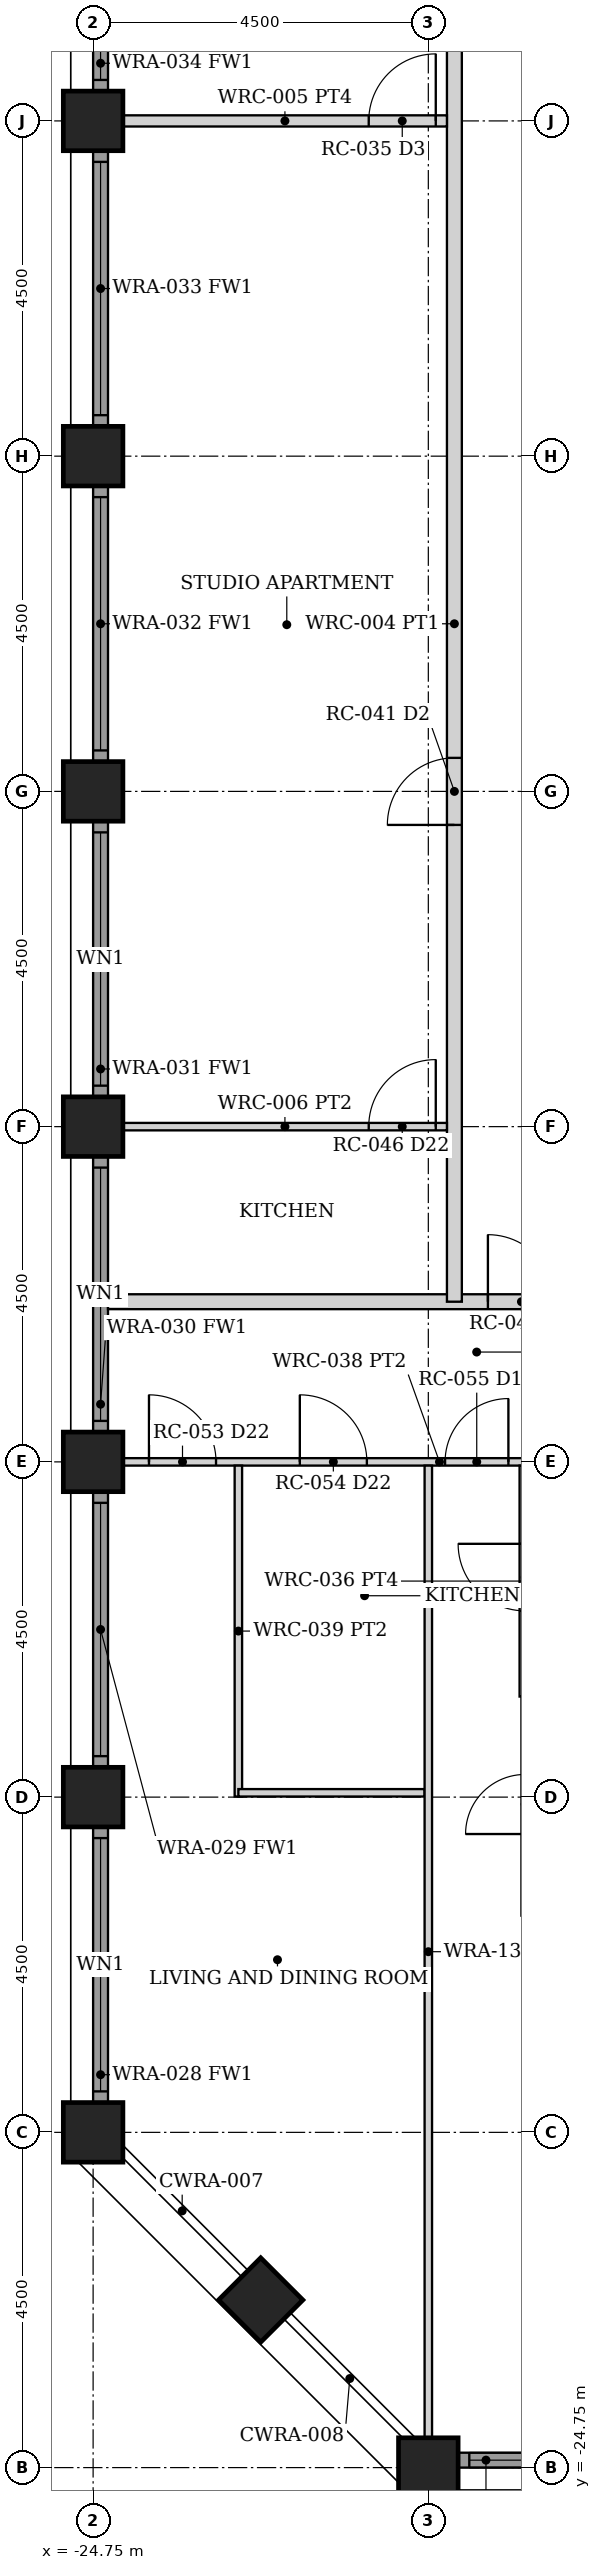
"""IFC4 building model, lengths in metres.
Left out: names, types, materials, properties, quantities, classifications, styles, units other than length and angle.
Written with IfcOpenShell. Run it as: python <this file> out.ifc"""

import sys

from ifc_helpers import new_model, si_unit, direction, frame, frame_2d, origin, origin_2d, place, context, subcontext, project, spatial, rectangle, hollow_rectangle, extrude, element, fill, save


model = new_model("IFC4")
c1 = context("Model", 3, precision=1e-05, world=origin(), true_north=direction((0.0, 1.0)))
c2 = subcontext(c1, "Body", "Model", "MODEL_VIEW")
j1 = project(units=[si_unit("LENGTHUNIT", "METRE"), si_unit("PLANEANGLEUNIT", "RADIAN")], contexts=[c1])
p1 = place(None, origin())
s1 = spatial("IfcSite", under=j1, at=p1, CompositionType="ELEMENT")
p2 = place(p1, origin())
s2 = spatial("IfcBuilding", under=s1, at=p2, CompositionType="ELEMENT")
p3 = place(p2, frame((0.0, 0.0, 47.5)))
s3 = spatial("IfcBuildingStorey", under=s2, at=p3, CompositionType="ELEMENT", Elevation=47.5)
for number, where, z_axis, x_axis in (
    (1, (-20.25, -24.75, 0.0), (0.0, 0.0, 1.0), (0.0, 1.0, 0.0)),
    (2, (-24.75, -20.25, 0.0), (0.0, 0.0, 1.0), (1.0, 0.0, 0.0)),
    (3, (-24.75, -15.75, 0.0), (0.0, 0.0, 1.0), (1.0, 0.0, 0.0)),
    (4, (-24.75, -11.25, 0.0), (0.0, 0.0, 1.0), (1.0, 0.0, 0.0)),
    (5, (-24.75, -6.75, 0.0), (0.0, 0.0, 1.0), (1.0, 0.0, 0.0)),
    (6, (-24.75, -2.25, 0.0), (0.0, 0.0, 1.0), (1.0, 0.0, 0.0)),
    (7, (-24.75, 2.25, 0.0), (0.0, 0.0, 1.0), (1.0, 0.0, 0.0)),
    (8, (-24.75, 6.75, 0.0), (0.0, 0.0, 1.0), (1.0, 0.0, 0.0)),
    (9, (-22.5, -22.5, 0.0), (0.0, 0.0, 1.0), (0.707, 0.707, 0.0)),
):
    element("IfcColumn", number, at=place(p3, frame(where, z_axis=z_axis, x_axis=x_axis)), inside=s3, PredefinedType="COLUMN", context=c2, shape_type="SweptSolid", body=[
        extrude(hollow_rectangle(XDim=0.8, YDim=0.8, WallThickness=0.07, at=origin_2d()), origin(), (0.0, 0.0, 1.0), 3.5),
    ])
p4 = place(p3, frame((-19.845, -24.65, 0.0), z_axis=(0.0, 0.0, 1.0), x_axis=(1.0, 0.0, 0.0)))
e10 = element("IfcWall", 10, at=p4, inside=s3, PredefinedType="SOLIDWALL", context=c2, shape_type="SweptSolid", body=[
    extrude(rectangle(XDim=3.69, YDim=0.2, at=frame_2d((1.845, 0.0))), origin(), (0.0, 0.0, 1.0), 2.379),
])
p5 = place(p4, frame((0.145, 0.0, 0.3)))
e11 = element("IfcOpeningElement", 11, at=p5, cuts=e10, PredefinedType="OPENING", context=c2, shape_type="SweptSolid", body=[
    extrude(rectangle(XDim=3.4, YDim=1.929, at=frame_2d((1.7, 0.964))), frame((0.0, 0.11, 0.0), z_axis=(0.0, -1.0, 0.0), x_axis=(1.0, 0.0, 0.0)), (0.0, 0.0, 1.0), 0.22),
])
p6 = place(p3, frame((-24.65, -19.845, 0.0), z_axis=(0.0, 0.0, 1.0), x_axis=(0.0, 1.0, 0.0)))
e12 = element("IfcWall", 12, at=p6, inside=s3, PredefinedType="SOLIDWALL", context=c2, shape_type="SweptSolid", body=[
    extrude(rectangle(XDim=3.69, YDim=0.2, at=frame_2d((1.845, 0.0))), origin(), (0.0, 0.0, 1.0), 2.379),
])
p7 = place(p6, frame((0.145, 0.0, 0.3)))
e13 = element("IfcOpeningElement", 13, at=p7, cuts=e12, PredefinedType="OPENING", context=c2, shape_type="SweptSolid", body=[
    extrude(rectangle(XDim=3.4, YDim=1.929, at=frame_2d((1.7, 0.964))), frame((0.0, 0.11, 0.0), z_axis=(0.0, -1.0, 0.0), x_axis=(1.0, 0.0, 0.0)), (0.0, 0.0, 1.0), 0.22),
])
p8 = place(p3, frame((-24.65, -15.345, 0.0), z_axis=(0.0, 0.0, 1.0), x_axis=(0.0, 1.0, 0.0)))
e14 = element("IfcWall", 14, at=p8, inside=s3, PredefinedType="SOLIDWALL", context=c2, shape_type="SweptSolid", body=[
    extrude(rectangle(XDim=3.69, YDim=0.2, at=frame_2d((1.845, 0.0))), origin(), (0.0, 0.0, 1.0), 2.379),
])
p9 = place(p8, frame((0.145, 0.0, 0.3)))
e15 = element("IfcOpeningElement", 15, at=p9, cuts=e14, PredefinedType="OPENING", context=c2, shape_type="SweptSolid", body=[
    extrude(rectangle(XDim=3.4, YDim=1.929, at=frame_2d((1.7, 0.964))), frame((0.0, 0.11, 0.0), z_axis=(0.0, -1.0, 0.0), x_axis=(1.0, 0.0, 0.0)), (0.0, 0.0, 1.0), 0.22),
])
p10 = place(p3, frame((-24.65, -10.845, 0.0), z_axis=(0.0, 0.0, 1.0), x_axis=(0.0, 1.0, 0.0)))
e16 = element("IfcWall", 16, at=p10, inside=s3, PredefinedType="SOLIDWALL", context=c2, shape_type="SweptSolid", body=[
    extrude(rectangle(XDim=3.69, YDim=0.2, at=frame_2d((1.845, 0.0))), origin(), (0.0, 0.0, 1.0), 2.379),
])
p11 = place(p10, frame((0.145, 0.0, 0.3)))
e17 = element("IfcOpeningElement", 17, at=p11, cuts=e16, PredefinedType="OPENING", context=c2, shape_type="SweptSolid", body=[
    extrude(rectangle(XDim=3.4, YDim=1.929, at=frame_2d((1.7, 0.964))), frame((0.0, 0.11, 0.0), z_axis=(0.0, -1.0, 0.0), x_axis=(1.0, 0.0, 0.0)), (0.0, 0.0, 1.0), 0.22),
])
p12 = place(p3, frame((-24.65, -6.345, 0.0), z_axis=(0.0, 0.0, 1.0), x_axis=(0.0, 1.0, 0.0)))
e18 = element("IfcWall", 18, at=p12, inside=s3, PredefinedType="SOLIDWALL", context=c2, shape_type="SweptSolid", body=[
    extrude(rectangle(XDim=3.69, YDim=0.2, at=frame_2d((1.845, 0.0))), origin(), (0.0, 0.0, 1.0), 2.379),
])
p13 = place(p12, frame((0.145, 0.0, 0.3)))
e19 = element("IfcOpeningElement", 19, at=p13, cuts=e18, PredefinedType="OPENING", context=c2, shape_type="SweptSolid", body=[
    extrude(rectangle(XDim=3.4, YDim=1.929, at=frame_2d((1.7, 0.964))), frame((0.0, 0.11, 0.0), z_axis=(0.0, -1.0, 0.0), x_axis=(1.0, 0.0, 0.0)), (0.0, 0.0, 1.0), 0.22),
])
p14 = place(p3, frame((-24.65, -1.845, 0.0), z_axis=(0.0, 0.0, 1.0), x_axis=(0.0, 1.0, 0.0)))
e20 = element("IfcWall", 20, at=p14, inside=s3, PredefinedType="SOLIDWALL", context=c2, shape_type="SweptSolid", body=[
    extrude(rectangle(XDim=3.69, YDim=0.2, at=frame_2d((1.845, 0.0))), origin(), (0.0, 0.0, 1.0), 2.379),
])
p15 = place(p14, frame((0.145, 0.0, 0.3)))
e21 = element("IfcOpeningElement", 21, at=p15, cuts=e20, PredefinedType="OPENING", context=c2, shape_type="SweptSolid", body=[
    extrude(rectangle(XDim=3.4, YDim=1.929, at=frame_2d((1.7, 0.964))), frame((0.0, 0.11, 0.0), z_axis=(0.0, -1.0, 0.0), x_axis=(1.0, 0.0, 0.0)), (0.0, 0.0, 1.0), 0.22),
])
p16 = place(p3, frame((-24.65, 2.655, 0.0), z_axis=(0.0, 0.0, 1.0), x_axis=(0.0, 1.0, 0.0)))
e22 = element("IfcWall", 22, at=p16, inside=s3, PredefinedType="SOLIDWALL", context=c2, shape_type="SweptSolid", body=[
    extrude(rectangle(XDim=3.69, YDim=0.2, at=frame_2d((1.845, 0.0))), origin(), (0.0, 0.0, 1.0), 2.379),
])
p17 = place(p16, frame((0.145, 0.0, 0.3)))
e23 = element("IfcOpeningElement", 23, at=p17, cuts=e22, PredefinedType="OPENING", context=c2, shape_type="SweptSolid", body=[
    extrude(rectangle(XDim=3.4, YDim=1.929, at=frame_2d((1.7, 0.964))), frame((0.0, 0.11, 0.0), z_axis=(0.0, -1.0, 0.0), x_axis=(1.0, 0.0, 0.0)), (0.0, 0.0, 1.0), 0.22),
])
p18 = place(p3, frame((-24.65, 7.155, 0.0), z_axis=(0.0, 0.0, 1.0), x_axis=(0.0, 1.0, 0.0)))
e24 = element("IfcWall", 24, at=p18, inside=s3, PredefinedType="SOLIDWALL", context=c2, shape_type="SweptSolid", body=[
    extrude(rectangle(XDim=3.69, YDim=0.2, at=frame_2d((1.845, 0.0))), origin(), (0.0, 0.0, 1.0), 2.379),
])
p19 = place(p18, frame((0.145, 0.0, 0.3)))
e25 = element("IfcOpeningElement", 25, at=p19, cuts=e24, PredefinedType="OPENING", context=c2, shape_type="SweptSolid", body=[
    extrude(rectangle(XDim=3.4, YDim=1.929, at=frame_2d((1.7, 0.964))), frame((0.0, 0.11, 0.0), z_axis=(0.0, -1.0, 0.0), x_axis=(1.0, 0.0, 0.0)), (0.0, 0.0, 1.0), 0.22),
])
p20 = place(p3, frame((-24.55, -9.1, 0.0), z_axis=(0.0, 0.0, 1.0), x_axis=(1.0, 0.0, 0.0)))
e26 = element("IfcWall", 26, at=p20, inside=s3, PredefinedType="PARTITIONING", context=c2, shape_type="SweptSolid", body=[
    extrude(rectangle(XDim=49.1, YDim=0.2, at=frame_2d((24.55, 0.0))), origin(), (0.0, 0.0, 1.0), 2.373),
])
p21 = place(p20, frame((5.1, 0.0, 0.0)))
e27 = element("IfcOpeningElement", 27, at=p21, cuts=e26, PredefinedType="OPENING", context=c2, shape_type="SweptSolid", body=[
    extrude(rectangle(XDim=0.9, YDim=2.1, at=frame_2d((0.45, 1.05))), frame((0.0, 0.11, 0.0), z_axis=(0.0, -1.0, 0.0), x_axis=(1.0, 0.0, 0.0)), (0.0, 0.0, 1.0), 0.22),
])
p22 = place(p20, frame((13.6, 0.0, 0.0)))
e28 = element("IfcOpeningElement", 28, at=p22, cuts=e26, PredefinedType="OPENING", context=c2, shape_type="SweptSolid", body=[
    extrude(rectangle(XDim=0.9, YDim=2.1, at=frame_2d((0.45, 1.05))), frame((0.0, 0.11, 0.0), z_axis=(0.0, -1.0, 0.0), x_axis=(1.0, 0.0, 0.0)), (0.0, 0.0, 1.0), 0.22),
])
p23 = place(p20, frame((18.1, 0.0, 0.0)))
e29 = element("IfcOpeningElement", 29, at=p23, cuts=e26, PredefinedType="OPENING", context=c2, shape_type="SweptSolid", body=[
    extrude(rectangle(XDim=0.9, YDim=2.1, at=frame_2d((0.45, 1.05))), frame((0.0, 0.11, 0.0), z_axis=(0.0, -1.0, 0.0), x_axis=(1.0, 0.0, 0.0)), (0.0, 0.0, 1.0), 0.22),
])
p24 = place(p20, frame((31.6, 0.0, 0.0)))
e30 = element("IfcOpeningElement", 30, at=p24, cuts=e26, PredefinedType="OPENING", context=c2, shape_type="SweptSolid", body=[
    extrude(rectangle(XDim=0.9, YDim=2.1, at=frame_2d((0.45, 1.05))), frame((0.0, 0.11, 0.0), z_axis=(0.0, -1.0, 0.0), x_axis=(1.0, 0.0, 0.0)), (0.0, 0.0, 1.0), 0.22),
])
p25 = place(p20, frame((43.1, 0.0, 0.0)))
e31 = element("IfcOpeningElement", 31, at=p25, cuts=e26, PredefinedType="OPENING", context=c2, shape_type="SweptSolid", body=[
    extrude(rectangle(XDim=0.9, YDim=2.1, at=frame_2d((0.45, 1.05))), frame((0.0, 0.11, 0.0), z_axis=(0.0, -1.0, 0.0), x_axis=(1.0, 0.0, 0.0)), (0.0, 0.0, 1.0), 0.22),
])
p26 = place(p3, frame((-19.9, -9.1, 0.0), z_axis=(0.0, 0.0, 1.0), x_axis=(0.0, 1.0, 0.0)))
e32 = element("IfcWall", 32, at=p26, inside=s3, PredefinedType="PARTITIONING", context=c2, shape_type="SweptSolid", body=[
    extrude(rectangle(XDim=18.2, YDim=0.2, at=frame_2d((9.1, 0.0))), origin(), (0.0, 0.0, 1.0), 2.373),
])
p27 = place(p26, frame((6.4, 0.0, 0.0)))
e33 = element("IfcOpeningElement", 33, at=p27, cuts=e32, PredefinedType="OPENING", context=c2, shape_type="SweptSolid", body=[
    extrude(rectangle(XDim=0.9, YDim=2.1, at=frame_2d((0.45, 1.05))), frame((0.0, 0.11, 0.0), z_axis=(0.0, -1.0, 0.0), x_axis=(1.0, 0.0, 0.0)), (0.0, 0.0, 1.0), 0.22),
])
p28 = place(p3, frame((-24.35, -11.25, 0.0), z_axis=(0.0, 0.0, 1.0), x_axis=(1.0, 0.0, 0.0)))
e34 = element("IfcWall", 34, at=p28, inside=s3, PredefinedType="PARTITIONING", context=c2, shape_type="SweptSolid", body=[
    extrude(rectangle(XDim=8.5, YDim=0.1, at=frame_2d((4.25, 0.0))), origin(), (0.0, 0.0, 1.0), 2.373),
])
p29 = place(p28, frame((2.375, 0.0, 0.0)))
e35 = element("IfcOpeningElement", 35, at=p29, cuts=e34, PredefinedType="OPENING", context=c2, shape_type="SweptSolid", body=[
    extrude(rectangle(XDim=0.9, YDim=2.1, at=frame_2d((0.45, 1.05))), frame((0.0, 0.06, 0.0), z_axis=(0.0, -1.0, 0.0), x_axis=(1.0, 0.0, 0.0)), (0.0, 0.0, 1.0), 0.12),
])
p30 = place(p28, frame((0.35, 0.0, 0.0)))
e36 = element("IfcOpeningElement", 36, at=p30, cuts=e34, PredefinedType="OPENING", context=c2, shape_type="SweptSolid", body=[
    extrude(rectangle(XDim=0.9, YDim=2.1, at=frame_2d((0.45, 1.05))), frame((0.0, 0.06, 0.0), z_axis=(0.0, -1.0, 0.0), x_axis=(1.0, 0.0, 0.0)), (0.0, 0.0, 1.0), 0.12),
])
p31 = place(p28, frame((4.325, 0.0, 0.0)))
e37 = element("IfcOpeningElement", 37, at=p31, cuts=e34, PredefinedType="OPENING", context=c2, shape_type="SweptSolid", body=[
    extrude(rectangle(XDim=0.85, YDim=2.1, at=frame_2d((0.425, 1.05))), frame((0.0, 0.06, 0.0), z_axis=(0.0, -1.0, 0.0), x_axis=(1.0, 0.0, 0.0)), (0.0, 0.0, 1.0), 0.12),
])
p32 = place(p28, frame((6.52, 0.0, 0.0)))
e38 = element("IfcOpeningElement", 38, at=p32, cuts=e34, PredefinedType="OPENING", context=c2, shape_type="SweptSolid", body=[
    extrude(rectangle(XDim=0.9, YDim=2.1, at=frame_2d((0.45, 1.05))), frame((0.0, 0.06, 0.0), z_axis=(0.0, -1.0, 0.0), x_axis=(1.0, 0.0, 0.0)), (0.0, 0.0, 1.0), 0.12),
])
p33 = place(p3, frame((-22.8, -15.742, 0.0), z_axis=(0.0, 0.0, 1.0), x_axis=(0.0, 1.0, 0.0)))
e39 = element("IfcWall", 39, at=p33, inside=s3, PredefinedType="PARTITIONING", context=c2, shape_type="SweptSolid", body=[
    extrude(rectangle(XDim=4.442, YDim=0.1, at=frame_2d((2.221, 0.0))), origin(), (0.0, 0.0, 1.0), 2.373),
])
p34 = place(p3, frame((-22.8, -15.692, 0.0), z_axis=(0.0, 0.0, 1.0), x_axis=(1.0, 0.0, 0.0)))
e40 = element("IfcWall", 40, at=p34, inside=s3, PredefinedType="PARTITIONING", context=c2, shape_type="SweptSolid", body=[
    extrude(rectangle(XDim=2.5, YDim=0.1, at=frame_2d((1.25, 0.0))), origin(), (0.0, 0.0, 1.0), 2.373),
])
p35 = place(p3, frame((-20.25, -24.35, 0.0), z_axis=(0.0, 0.0, 1.0), x_axis=(0.0, 1.0, 0.0)))
e41 = element("IfcWall", 41, at=p35, inside=s3, PredefinedType="PARTITIONING", context=c2, shape_type="SweptSolid", body=[
    extrude(rectangle(XDim=13.05, YDim=0.1, at=frame_2d((6.525, 0.0))), origin(), (0.0, 0.0, 1.0), 2.373),
])
p36 = place(p3, frame((-18.95, -14.4, 0.0), z_axis=(0.0, 0.0, 1.0), x_axis=(0.0, 1.0, 0.0)))
e42 = element("IfcWall", 42, at=p36, inside=s3, PredefinedType="PARTITIONING", context=c2, shape_type="SweptSolid", body=[
    extrude(rectangle(XDim=3.1, YDim=0.15, at=frame_2d((1.55, 0.0))), origin(), (0.0, 0.0, 1.0), 2.373),
])
p37 = place(p36, frame((1.15, 0.0, 0.0)))
e43 = element("IfcOpeningElement", 43, at=p37, cuts=e42, PredefinedType="OPENING", context=c2, shape_type="SweptSolid", body=[
    extrude(rectangle(XDim=0.9, YDim=2.1, at=frame_2d((0.45, 1.05))), frame((0.0, 0.085, 0.0), z_axis=(0.0, -1.0, 0.0), x_axis=(1.0, 0.0, 0.0)), (0.0, 0.0, 1.0), 0.17),
])
p38 = place(p3, frame((-24.35, -6.75, 0.0), z_axis=(0.0, 0.0, 1.0), x_axis=(1.0, 0.0, 0.0)))
e44 = element("IfcWall", 44, at=p38, inside=s3, PredefinedType="PARTITIONING", context=c2, shape_type="SweptSolid", body=[
    extrude(rectangle(XDim=4.35, YDim=0.1, at=frame_2d((2.175, 0.0))), origin(), (0.0, 0.0, 1.0), 2.373),
])
p39 = place(p38, frame((3.3, 0.0, 0.0)))
e45 = element("IfcOpeningElement", 45, at=p39, cuts=e44, PredefinedType="OPENING", context=c2, shape_type="SweptSolid", body=[
    extrude(rectangle(XDim=0.9, YDim=2.1, at=frame_2d((0.45, 1.05))), frame((0.0, 0.06, 0.0), z_axis=(0.0, -1.0, 0.0), x_axis=(1.0, 0.0, 0.0)), (0.0, 0.0, 1.0), 0.12),
])
p40 = place(p3, frame((-24.35, 6.75, 0.0), z_axis=(0.0, 0.0, 1.0), x_axis=(1.0, 0.0, 0.0)))
e46 = element("IfcWall", 46, at=p40, inside=s3, PredefinedType="PARTITIONING", context=c2, shape_type="SweptSolid", body=[
    extrude(rectangle(XDim=4.35, YDim=0.15, at=frame_2d((2.175, 0.0))), origin(), (0.0, 0.0, 1.0), 2.373),
])
p41 = place(p40, frame((3.3, 0.0, 0.0)))
e47 = element("IfcOpeningElement", 47, at=p41, cuts=e46, PredefinedType="OPENING", context=c2, shape_type="SweptSolid", body=[
    extrude(rectangle(XDim=0.9, YDim=2.1, at=frame_2d((0.45, 1.05))), frame((0.0, 0.085, 0.0), z_axis=(0.0, -1.0, 0.0), x_axis=(1.0, 0.0, 0.0)), (0.0, 0.0, 1.0), 0.17),
])
p42 = place(p5, origin())
e48 = element("IfcWindow", 48, at=p42, inside=s3, PartitioningType="SINGLE_PANEL", PredefinedType="WINDOW", context=c2, shape_type="SweptSolid", body=[
    extrude(rectangle(XDim=3.4, YDim=1.929, at=frame_2d((1.7, 0.964))), frame((0.0, 0.03, 0.0), z_axis=(0.0, -1.0, 0.0), x_axis=(1.0, 0.0, 0.0)), (0.0, 0.0, 1.0), 0.06),
])
fill(e11, e48)
p43 = place(p7, origin())
e49 = element("IfcWindow", 49, at=p43, inside=s3, PartitioningType="SINGLE_PANEL", PredefinedType="WINDOW", context=c2, shape_type="SweptSolid", body=[
    extrude(rectangle(XDim=3.4, YDim=1.929, at=frame_2d((1.7, 0.964))), frame((0.0, 0.03, 0.0), z_axis=(0.0, -1.0, 0.0), x_axis=(1.0, 0.0, 0.0)), (0.0, 0.0, 1.0), 0.06),
])
fill(e13, e49)
p44 = place(p9, origin())
e50 = element("IfcWindow", 50, at=p44, inside=s3, PartitioningType="SINGLE_PANEL", PredefinedType="WINDOW", context=c2, shape_type="SweptSolid", body=[
    extrude(rectangle(XDim=3.4, YDim=1.929, at=frame_2d((1.7, 0.964))), frame((0.0, 0.03, 0.0), z_axis=(0.0, -1.0, 0.0), x_axis=(1.0, 0.0, 0.0)), (0.0, 0.0, 1.0), 0.06),
])
fill(e15, e50)
p45 = place(p11, origin())
e51 = element("IfcWindow", 51, at=p45, inside=s3, PartitioningType="SINGLE_PANEL", PredefinedType="WINDOW", context=c2, shape_type="SweptSolid", body=[
    extrude(rectangle(XDim=3.4, YDim=1.929, at=frame_2d((1.7, 0.964))), frame((0.0, 0.03, 0.0), z_axis=(0.0, -1.0, 0.0), x_axis=(1.0, 0.0, 0.0)), (0.0, 0.0, 1.0), 0.06),
])
fill(e17, e51)
p46 = place(p13, origin())
e52 = element("IfcWindow", 52, at=p46, inside=s3, PartitioningType="SINGLE_PANEL", PredefinedType="WINDOW", context=c2, shape_type="SweptSolid", body=[
    extrude(rectangle(XDim=3.4, YDim=1.929, at=frame_2d((1.7, 0.964))), frame((0.0, 0.03, 0.0), z_axis=(0.0, -1.0, 0.0), x_axis=(1.0, 0.0, 0.0)), (0.0, 0.0, 1.0), 0.06),
])
fill(e19, e52)
p47 = place(p15, origin())
e53 = element("IfcWindow", 53, at=p47, inside=s3, PartitioningType="SINGLE_PANEL", PredefinedType="WINDOW", context=c2, shape_type="SweptSolid", body=[
    extrude(rectangle(XDim=3.4, YDim=1.929, at=frame_2d((1.7, 0.964))), frame((0.0, 0.03, 0.0), z_axis=(0.0, -1.0, 0.0), x_axis=(1.0, 0.0, 0.0)), (0.0, 0.0, 1.0), 0.06),
])
fill(e21, e53)
p48 = place(p17, origin())
e54 = element("IfcWindow", 54, at=p48, inside=s3, PartitioningType="SINGLE_PANEL", PredefinedType="WINDOW", context=c2, shape_type="SweptSolid", body=[
    extrude(rectangle(XDim=3.4, YDim=1.929, at=frame_2d((1.7, 0.964))), frame((0.0, 0.03, 0.0), z_axis=(0.0, -1.0, 0.0), x_axis=(1.0, 0.0, 0.0)), (0.0, 0.0, 1.0), 0.06),
])
fill(e23, e54)
p49 = place(p19, origin())
e55 = element("IfcWindow", 55, at=p49, inside=s3, PartitioningType="SINGLE_PANEL", PredefinedType="WINDOW", context=c2, shape_type="SweptSolid", body=[
    extrude(rectangle(XDim=3.4, YDim=1.929, at=frame_2d((1.7, 0.964))), frame((0.0, 0.03, 0.0), z_axis=(0.0, -1.0, 0.0), x_axis=(1.0, 0.0, 0.0)), (0.0, 0.0, 1.0), 0.06),
])
fill(e25, e55)
p50 = place(p21, origin())
e56 = element("IfcDoor", 56, at=p50, inside=s3, OperationType="SINGLE_SWING_LEFT", PredefinedType="DOOR", context=c2, shape_type="SweptSolid", body=[
    extrude(rectangle(XDim=0.9, YDim=2.1, at=frame_2d((0.45, 1.05))), frame((0.0, 0.025, 0.0), z_axis=(0.0, -1.0, 0.0), x_axis=(1.0, 0.0, 0.0)), (0.0, 0.0, 1.0), 0.05),
])
fill(e27, e56)
p51 = place(p29, origin())
e57 = element("IfcDoor", 57, at=p51, inside=s3, OperationType="SINGLE_SWING_LEFT", PredefinedType="DOOR", context=c2, shape_type="SweptSolid", body=[
    extrude(rectangle(XDim=0.9, YDim=2.1, at=frame_2d((0.45, 1.05))), frame((0.0, 0.025, 0.0), z_axis=(0.0, -1.0, 0.0), x_axis=(1.0, 0.0, 0.0)), (0.0, 0.0, 1.0), 0.05),
])
fill(e35, e57)
p52 = place(p30, origin())
e58 = element("IfcDoor", 58, at=p52, inside=s3, OperationType="SINGLE_SWING_LEFT", PredefinedType="DOOR", context=c2, shape_type="SweptSolid", body=[
    extrude(rectangle(XDim=0.9, YDim=2.1, at=frame_2d((0.45, 1.05))), frame((0.0, 0.025, 0.0), z_axis=(0.0, -1.0, 0.0), x_axis=(1.0, 0.0, 0.0)), (0.0, 0.0, 1.0), 0.05),
])
fill(e36, e58)
p53 = place(p31, origin())
e59 = element("IfcDoor", 59, at=p53, inside=s3, OperationType="SINGLE_SWING_RIGHT", PredefinedType="DOOR", context=c2, shape_type="SweptSolid", body=[
    extrude(rectangle(XDim=0.85, YDim=2.1, at=frame_2d((0.425, 1.05))), frame((0.0, 0.025, 0.0), z_axis=(0.0, -1.0, 0.0), x_axis=(1.0, 0.0, 0.0)), (0.0, 0.0, 1.0), 0.05),
])
fill(e37, e59)
p54 = place(p39, origin())
e60 = element("IfcDoor", 60, at=p54, inside=s3, OperationType="SINGLE_SWING_RIGHT", PredefinedType="DOOR", context=c2, shape_type="SweptSolid", body=[
    extrude(rectangle(XDim=0.9, YDim=2.1, at=frame_2d((0.45, 1.05))), frame((0.0, 0.025, 0.0), z_axis=(0.0, -1.0, 0.0), x_axis=(1.0, 0.0, 0.0)), (0.0, 0.0, 1.0), 0.05),
])
fill(e45, e60)
p55 = place(p41, origin())
e61 = element("IfcDoor", 61, at=p55, inside=s3, OperationType="SINGLE_SWING_RIGHT", PredefinedType="DOOR", context=c2, shape_type="SweptSolid", body=[
    extrude(rectangle(XDim=0.9, YDim=2.1, at=frame_2d((0.45, 1.05))), frame((0.0, 0.025, 0.0), z_axis=(0.0, -1.0, 0.0), x_axis=(1.0, 0.0, 0.0)), (0.0, 0.0, 1.0), 0.05),
])
fill(e47, e61)
p56 = place(p27, origin())
e62 = element("IfcDoor", 62, at=p56, inside=s3, OperationType="SINGLE_SWING_LEFT", PredefinedType="DOOR", context=c2, shape_type="SweptSolid", body=[
    extrude(rectangle(XDim=0.9, YDim=2.1, at=frame_2d((0.45, 1.05))), frame((0.0, 0.025, 0.0), z_axis=(0.0, -1.0, 0.0), x_axis=(1.0, 0.0, 0.0)), (0.0, 0.0, 1.0), 0.05),
])
fill(e33, e62)
save(model, sys.argv[1])
